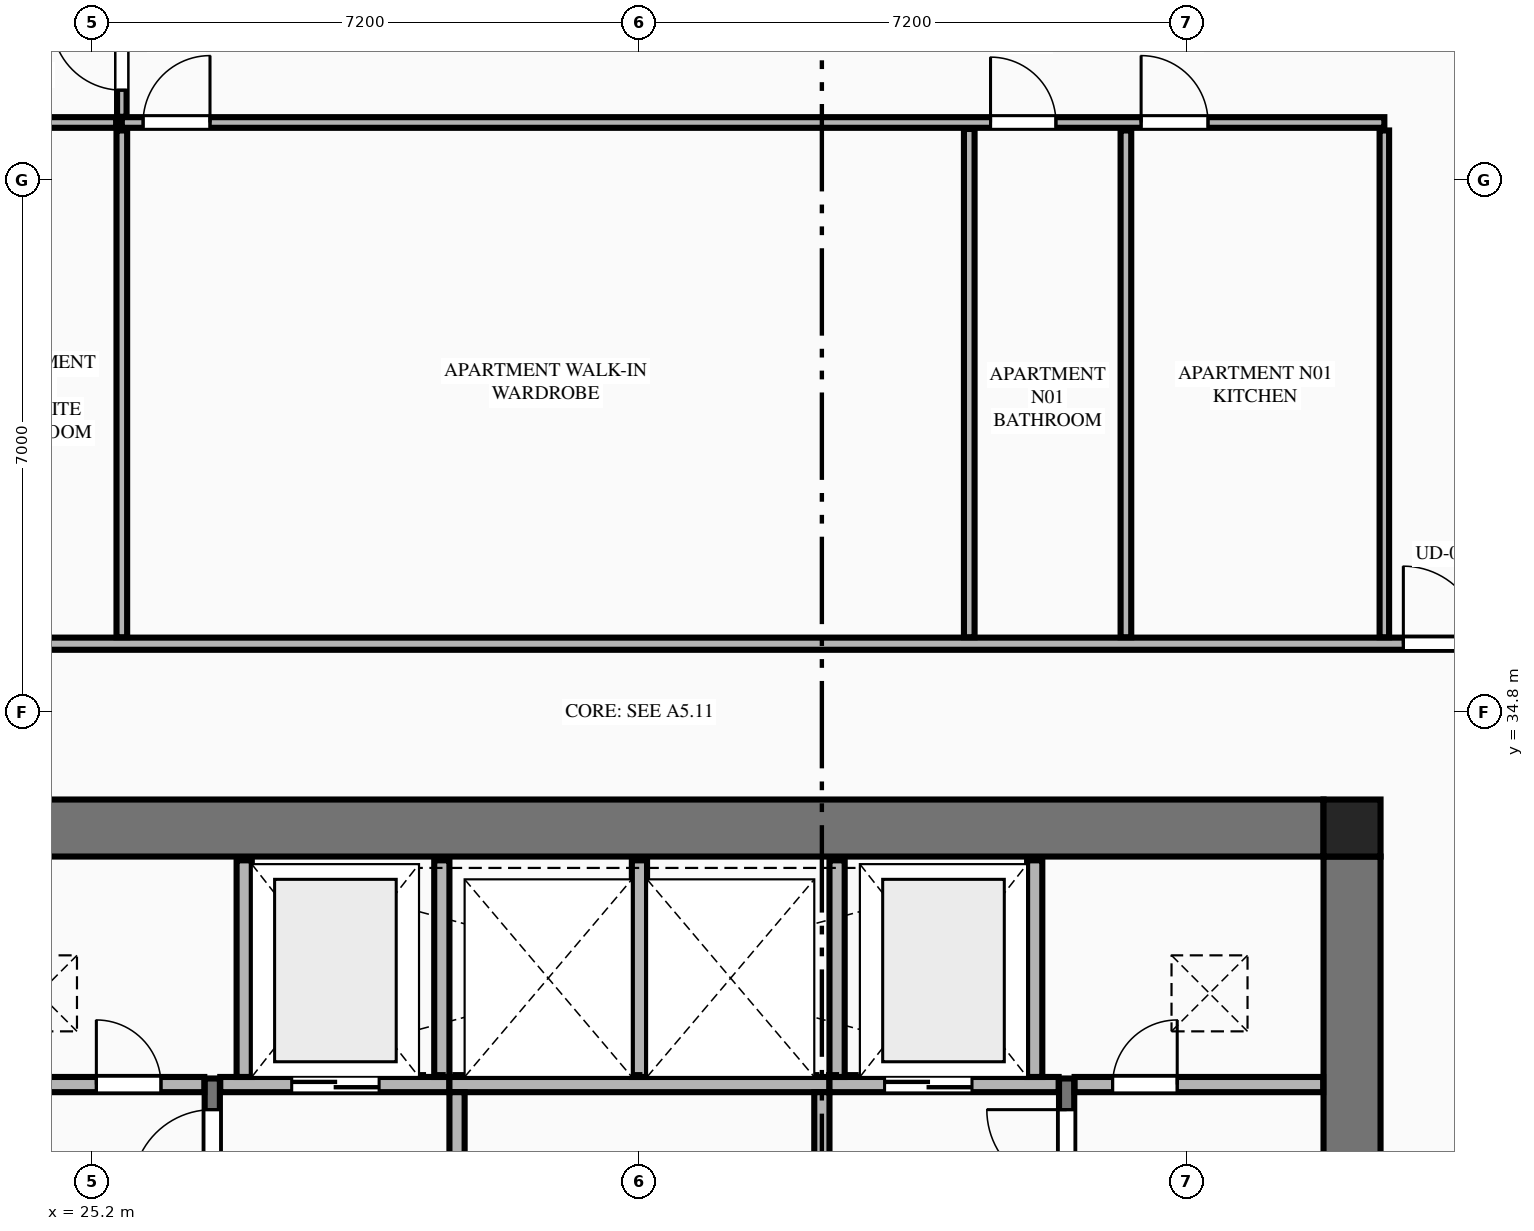
"""IFC4 building model, lengths in metres.
Left out: names, types, materials, properties, quantities, classifications, styles, units other than length and angle.
Written with IfcOpenShell. Run it as: python <this file> out.ifc"""

import sys

from ifc_helpers import new_model, si_unit, direction, frame, frame_2d, origin, origin_2d, place, context, subcontext, project, spatial, rectangle, extrude, element, fill, save


model = new_model("IFC4")
c1 = context("Model", 3, precision=1e-05, world=origin(), true_north=direction((0.0, 1.0)))
c2 = subcontext(c1, "Body", "Model", "MODEL_VIEW")
j1 = project(units=[si_unit("LENGTHUNIT", "METRE"), si_unit("PLANEANGLEUNIT", "RADIAN")], contexts=[c1])
p1 = place(None, origin())
s1 = spatial("IfcSite", under=j1, at=p1, CompositionType="ELEMENT")
p2 = place(p1, origin())
s2 = spatial("IfcBuilding", under=s1, at=p2, CompositionType="ELEMENT")
p3 = place(p2, frame((0.0, 0.0, 83.55)))
s3 = spatial("IfcBuildingStorey", under=s2, at=p3, CompositionType="ELEMENT", Elevation=83.55)
p4 = place(p3, frame((41.775, 33.275, 0.0), z_axis=(0.0, 0.0, 1.0), x_axis=(1.0, 0.0, 0.0)))
e1 = element("IfcColumn", 1, at=p4, inside=s3, PredefinedType="COLUMN", context=c2, shape_type="SweptSolid", body=[
    extrude(rectangle(XDim=0.75, YDim=0.75, at=origin_2d()), origin(), (0.0, 0.0, 1.0), 3.55),
])
p5 = place(p3, frame((23.4, 33.275, 0.0), z_axis=(0.0, 0.0, 1.0), x_axis=(1.0, 0.0, 0.0)))
e2 = element("IfcWall", 2, at=p5, inside=s3, PredefinedType="SHEAR", context=c2, shape_type="SweptSolid", body=[
    extrude(rectangle(XDim=18.0, YDim=0.75, at=frame_2d((9.0, 0.0))), origin(), (0.0, 0.0, 1.0), 3.33),
])
p6 = place(p3, frame((41.775, 18.9, 0.0), z_axis=(0.0, 0.0, 1.0), x_axis=(0.0, 1.0, 0.0)))
e3 = element("IfcWall", 3, at=p6, inside=s3, PredefinedType="SHEAR", context=c2, shape_type="SweptSolid", body=[
    extrude(rectangle(XDim=14.0, YDim=0.75, at=frame_2d((7.0, 0.0))), origin(), (0.0, 0.0, 1.0), 3.33),
])
p7 = place(p6, frame((2.94, 0.0, 0.0)))
e4 = element("IfcOpeningElement", 4, at=p7, cuts=e3, PredefinedType="OPENING", context=c2, shape_type="SweptSolid", body=[
    extrude(rectangle(XDim=1.22, YDim=2.25, at=frame_2d((0.61, 1.125))), frame((0.0, 0.385, 0.0), z_axis=(0.0, -1.0, 0.0), x_axis=(1.0, 0.0, 0.0)), (0.0, 0.0, 1.0), 0.77),
])
p8 = place(p3, frame((26.78, 23.2, 0.0), z_axis=(0.0, 0.0, 1.0), x_axis=(0.0, 1.0, 0.0)))
e5 = element("IfcWall", 5, at=p8, inside=s3, PredefinedType="SHEAR", context=c2, shape_type="SweptSolid", body=[
    extrude(rectangle(XDim=6.78, YDim=0.2, at=frame_2d((3.39, 0.0))), origin(), (0.0, 0.0, 1.0), 3.55),
])
p9 = place(p8, frame((5.32, 0.0, 0.0)))
e6 = element("IfcOpeningElement", 6, at=p9, cuts=e5, PredefinedType="OPENING", context=c2, shape_type="SweptSolid", body=[
    extrude(rectangle(XDim=1.05, YDim=2.15, at=frame_2d((0.525, 1.075))), frame((0.0, 0.11, 0.0), z_axis=(0.0, -1.0, 0.0), x_axis=(1.0, 0.0, 0.0)), (0.0, 0.0, 1.0), 0.22),
])
p10 = place(p3, frame((38.02, 23.2, 0.0), z_axis=(0.0, 0.0, 1.0), x_axis=(0.0, 1.0, 0.0)))
e7 = element("IfcWall", 7, at=p10, inside=s3, PredefinedType="SHEAR", context=c2, shape_type="SweptSolid", body=[
    extrude(rectangle(XDim=6.78, YDim=0.2, at=frame_2d((3.39, 0.0))), origin(), (0.0, 0.0, 1.0), 3.55),
])
p11 = place(p10, frame((5.32, 0.0, 0.0)))
e8 = element("IfcOpeningElement", 8, at=p11, cuts=e7, PredefinedType="OPENING", context=c2, shape_type="SweptSolid", body=[
    extrude(rectangle(XDim=1.05, YDim=2.15, at=frame_2d((0.525, 1.075))), frame((0.0, 0.11, 0.0), z_axis=(0.0, -1.0, 0.0), x_axis=(1.0, 0.0, 0.0)), (0.0, 0.0, 1.0), 0.22),
])
p12 = place(p3, frame((23.405, 29.9, 0.0), z_axis=(0.0, 0.0, 1.0), x_axis=(1.0, 0.0, 0.0)))
e9 = element("IfcWall", 9, at=p12, inside=s3, PredefinedType="PLUMBINGWALL", context=c2, shape_type="SweptSolid", body=[
    extrude(rectangle(XDim=3.27, YDim=0.2, at=frame_2d((1.635, 0.0))), origin(), (0.0, 0.0, 1.0), 3.33),
])
p13 = place(p12, frame((1.85, 0.0, 0.0)))
e10 = element("IfcOpeningElement", 10, at=p13, cuts=e9, PredefinedType="OPENING", context=c2, shape_type="SweptSolid", body=[
    extrude(rectangle(XDim=0.85, YDim=2.05, at=frame_2d((0.425, 1.025))), frame((0.0, 0.11, 0.0), z_axis=(0.0, -1.0, 0.0), x_axis=(1.0, 0.0, 0.0)), (0.0, 0.0, 1.0), 0.22),
])
p14 = place(p3, frame((26.885, 29.9, 0.0), z_axis=(0.0, 0.0, 1.0), x_axis=(1.0, 0.0, 0.0)))
e11 = element("IfcWall", 11, at=p14, inside=s3, PredefinedType="PLUMBINGWALL", context=c2, shape_type="SweptSolid", body=[
    extrude(rectangle(XDim=3.015, YDim=0.2, at=frame_2d((1.507, 0.0))), origin(), (0.0, 0.0, 1.0), 3.33),
])
p15 = place(p14, frame((0.94, 0.0, 0.0)))
e12 = element("IfcOpeningElement", 12, at=p15, cuts=e11, PredefinedType="OPENING", context=c2, shape_type="SweptSolid", body=[
    extrude(rectangle(XDim=1.15, YDim=2.2, at=frame_2d((0.575, 1.1))), frame((0.0, 0.11, 0.0), z_axis=(0.0, -1.0, 0.0), x_axis=(1.0, 0.0, 0.0)), (0.0, 0.0, 1.0), 0.22),
])
p16 = place(p3, frame((29.9, 29.9, 0.0), z_axis=(0.0, 0.0, 1.0), x_axis=(1.0, 0.0, 0.0)))
e13 = element("IfcWall", 13, at=p16, inside=s3, PredefinedType="PLUMBINGWALL", context=c2, shape_type="SweptSolid", body=[
    extrude(rectangle(XDim=5.0, YDim=0.2, at=frame_2d((2.5, 0.0))), origin(), (0.0, 0.0, 1.0), 3.33),
])
p17 = place(p3, frame((34.9, 29.9, 0.0), z_axis=(0.0, 0.0, 1.0), x_axis=(1.0, 0.0, 0.0)))
e14 = element("IfcWall", 14, at=p17, inside=s3, PredefinedType="PLUMBINGWALL", context=c2, shape_type="SweptSolid", body=[
    extrude(rectangle(XDim=3.015, YDim=0.2, at=frame_2d((1.508, 0.0))), origin(), (0.0, 0.0, 1.0), 3.33),
])
p18 = place(p17, frame((0.725, 0.0, 0.0)))
e15 = element("IfcOpeningElement", 15, at=p18, cuts=e14, PredefinedType="OPENING", context=c2, shape_type="SweptSolid", body=[
    extrude(rectangle(XDim=1.15, YDim=2.2, at=frame_2d((0.575, 1.1))), frame((0.0, 0.11, 0.0), z_axis=(0.0, -1.0, 0.0), x_axis=(1.0, 0.0, 0.0)), (0.0, 0.0, 1.0), 0.22),
])
p19 = place(p3, frame((38.125, 29.9, 0.0), z_axis=(0.0, 0.0, 1.0), x_axis=(1.0, 0.0, 0.0)))
e16 = element("IfcWall", 16, at=p19, inside=s3, PredefinedType="PLUMBINGWALL", context=c2, shape_type="SweptSolid", body=[
    extrude(rectangle(XDim=3.27, YDim=0.2, at=frame_2d((1.635, 0.0))), origin(), (0.0, 0.0, 1.0), 3.33),
])
p20 = place(p19, frame((0.5, 0.0, 0.0)))
e17 = element("IfcOpeningElement", 17, at=p20, cuts=e16, PredefinedType="OPENING", context=c2, shape_type="SweptSolid", body=[
    extrude(rectangle(XDim=0.85, YDim=2.05, at=frame_2d((0.425, 1.025))), frame((0.0, 0.11, 0.0), z_axis=(0.0, -1.0, 0.0), x_axis=(1.0, 0.0, 0.0)), (0.0, 0.0, 1.0), 0.22),
])
for number, where, z_axis, x_axis in (
    (18, (27.2, 30.0, 0.0), (0.0, 0.0, 1.0), (0.0, 1.0, 0.0)),
    (19, (29.8, 30.0, 0.0), (0.0, 0.0, 1.0), (0.0, 1.0, 0.0)),
    (20, (32.4, 30.0, 0.0), (0.0, 0.0, 1.0), (0.0, 1.0, 0.0)),
    (21, (35.0, 30.0, 0.0), (0.0, 0.0, 1.0), (0.0, 1.0, 0.0)),
    (22, (37.6, 30.0, 0.0), (0.0, 0.0, 1.0), (0.0, 1.0, 0.0)),
):
    element("IfcWall", number, at=place(p3, frame(where, z_axis=z_axis, x_axis=x_axis)), inside=s3, PredefinedType="PLUMBINGWALL", context=c2, shape_type="SweptSolid", body=[
        extrude(rectangle(XDim=2.85, YDim=0.2, at=frame_2d((1.425, 0.0))), origin(), (0.0, 0.0, 1.0), 3.33),
    ])
p21 = place(p3, frame((30.0, 27.05, 0.0), z_axis=(0.0, 0.0, 1.0), x_axis=(0.0, 1.0, 0.0)))
e23 = element("IfcWall", 23, at=p21, inside=s3, PredefinedType="PLUMBINGWALL", context=c2, shape_type="SweptSolid", body=[
    extrude(rectangle(XDim=2.75, YDim=0.2, at=frame_2d((1.375, 0.0))), origin(), (0.0, 0.0, 1.0), 3.33),
])
p22 = place(p21, frame((0.85, 0.0, 0.0)))
e24 = element("IfcOpeningElement", 24, at=p22, cuts=e23, PredefinedType="OPENING", context=c2, shape_type="SweptSolid", body=[
    extrude(rectangle(XDim=1.0, YDim=2.15, at=frame_2d((0.5, 1.075))), frame((0.0, 0.11, 0.0), z_axis=(0.0, -1.0, 0.0), x_axis=(1.0, 0.0, 0.0)), (0.0, 0.0, 1.0), 0.22),
])
p23 = place(p3, frame((34.8, 27.05, 0.0), z_axis=(0.0, 0.0, 1.0), x_axis=(0.0, 1.0, 0.0)))
e25 = element("IfcWall", 25, at=p23, inside=s3, PredefinedType="PLUMBINGWALL", context=c2, shape_type="SweptSolid", body=[
    extrude(rectangle(XDim=2.75, YDim=0.2, at=frame_2d((1.375, 0.0))), origin(), (0.0, 0.0, 1.0), 3.33),
])
p24 = place(p23, frame((0.85, 0.0, 0.0)))
e26 = element("IfcOpeningElement", 26, at=p24, cuts=e25, PredefinedType="OPENING", context=c2, shape_type="SweptSolid", body=[
    extrude(rectangle(XDim=1.0, YDim=2.15, at=frame_2d((0.5, 1.075))), frame((0.0, 0.11, 0.0), z_axis=(0.0, -1.0, 0.0), x_axis=(1.0, 0.0, 0.0)), (0.0, 0.0, 1.0), 0.22),
])
p25 = place(p3, frame((20.145, 35.7, 0.0), z_axis=(0.0, 0.0, 1.0), x_axis=(1.0, 0.0, 0.0)))
e27 = element("IfcWall", 27, at=p25, inside=s3, PredefinedType="PARTITIONING", context=c2, shape_type="SweptSolid", body=[
    extrude(rectangle(XDim=24.51, YDim=0.16, at=frame_2d((12.255, 0.0))), origin(), (0.0, 0.0, 1.0), 3.33),
])
p26 = place(p25, frame((22.305, 0.0, 0.0)))
e28 = element("IfcOpeningElement", 28, at=p26, cuts=e27, PredefinedType="OPENING", context=c2, shape_type="SweptSolid", body=[
    extrude(rectangle(XDim=1.02, YDim=2.25, at=frame_2d((0.51, 1.125))), frame((0.0, 0.09, 0.0), z_axis=(0.0, -1.0, 0.0), x_axis=(1.0, 0.0, 0.0)), (0.0, 0.0, 1.0), 0.18),
])
p27 = place(p3, frame((42.2, 35.785, 0.0), z_axis=(0.0, 0.0, 1.0), x_axis=(0.0, 1.0, 0.0)))
e29 = element("IfcWall", 29, at=p27, inside=s3, PredefinedType="PARTITIONING", context=c2, shape_type="SweptSolid", body=[
    extrude(rectangle(XDim=6.667, YDim=0.125, at=frame_2d((3.333, 0.0))), origin(), (0.0, 0.0, 1.0), 2.636),
])
p28 = place(p3, frame((25.59, 42.557, 0.0), z_axis=(0.0, 0.0, 1.0), x_axis=(1.0, 0.0, 0.0)))
e30 = element("IfcWall", 30, at=p28, inside=s3, PredefinedType="PLUMBINGWALL", context=c2, shape_type="SweptSolid", body=[
    extrude(rectangle(XDim=16.61, YDim=0.14, at=frame_2d((8.305, 0.0))), origin(), (0.0, 0.0, 1.0), 3.33),
])
p29 = place(p28, frame((0.28, 0.0, 0.0)))
e31 = element("IfcOpeningElement", 31, at=p29, cuts=e30, PredefinedType="OPENING", context=c2, shape_type="SweptSolid", body=[
    extrude(rectangle(XDim=0.88, YDim=2.15, at=frame_2d((0.44, 1.075))), frame((0.0, 0.08, 0.0), z_axis=(0.0, -1.0, 0.0), x_axis=(1.0, 0.0, 0.0)), (0.0, 0.0, 1.0), 0.16),
])
p30 = place(p28, frame((11.429, 0.0, 0.0)))
e32 = element("IfcOpeningElement", 32, at=p30, cuts=e30, PredefinedType="OPENING", context=c2, shape_type="SweptSolid", body=[
    extrude(rectangle(XDim=0.86, YDim=2.1, at=frame_2d((0.43, 1.05))), frame((0.0, 0.08, 0.0), z_axis=(0.0, -1.0, 0.0), x_axis=(1.0, 0.0, 0.0)), (0.0, 0.0, 1.0), 0.16),
])
p31 = place(p28, frame((13.41, 0.0, 0.0)))
e33 = element("IfcOpeningElement", 33, at=p31, cuts=e30, PredefinedType="OPENING", context=c2, shape_type="SweptSolid", body=[
    extrude(rectangle(XDim=0.88, YDim=2.15, at=frame_2d((0.44, 1.075))), frame((0.0, 0.08, 0.0), z_axis=(0.0, -1.0, 0.0), x_axis=(1.0, 0.0, 0.0)), (0.0, 0.0, 1.0), 0.16),
])
p32 = place(p3, frame((20.145, 42.557, 0.0), z_axis=(0.0, 0.0, 1.0), x_axis=(1.0, 0.0, 0.0)))
e34 = element("IfcWall", 34, at=p32, inside=s3, PredefinedType="PLUMBINGWALL", context=c2, shape_type="SweptSolid", body=[
    extrude(rectangle(XDim=5.37, YDim=0.14, at=frame_2d((2.685, 0.0))), origin(), (0.0, 0.0, 1.0), 3.33),
])
p33 = place(p32, frame((0.28, 0.0, 0.0)))
e35 = element("IfcOpeningElement", 35, at=p33, cuts=e34, PredefinedType="OPENING", context=c2, shape_type="SweptSolid", body=[
    extrude(rectangle(XDim=0.88, YDim=2.15, at=frame_2d((0.44, 1.075))), frame((0.0, 0.08, 0.0), z_axis=(0.0, -1.0, 0.0), x_axis=(1.0, 0.0, 0.0)), (0.0, 0.0, 1.0), 0.16),
])
p34 = place(p32, frame((3.589, 0.0, 0.0)))
e36 = element("IfcOpeningElement", 36, at=p34, cuts=e34, PredefinedType="OPENING", context=c2, shape_type="SweptSolid", body=[
    extrude(rectangle(XDim=0.86, YDim=2.1, at=frame_2d((0.43, 1.05))), frame((0.0, 0.08, 0.0), z_axis=(0.0, -1.0, 0.0), x_axis=(1.0, 0.0, 0.0)), (0.0, 0.0, 1.0), 0.16),
])
for number, where, z_axis, x_axis in (
    (37, (38.8, 35.785, 0.0), (0.0, 0.0, 1.0), (0.0, 1.0, 0.0)),
    (38, (25.59, 35.785, 0.0), (0.0, 0.0, 1.0), (0.0, 1.0, 0.0)),
):
    element("IfcWall", number, at=place(p3, frame(where, z_axis=z_axis, x_axis=x_axis)), inside=s3, PredefinedType="PLUMBINGWALL", context=c2, shape_type="SweptSolid", body=[
        extrude(rectangle(XDim=6.667, YDim=0.14, at=frame_2d((3.333, 0.0))), origin(), (0.0, 0.0, 1.0), 3.33),
    ])
p35 = place(p3, frame((25.59, 42.632, 0.0), z_axis=(0.0, 0.0, 1.0), x_axis=(0.0, 1.0, 0.0)))
e39 = element("IfcWall", 39, at=p35, inside=s3, PredefinedType="PARTITIONING", context=c2, shape_type="SweptSolid", body=[
    extrude(rectangle(XDim=6.603, YDim=0.125, at=frame_2d((3.302, 0.0))), origin(), (0.0, 0.0, 1.0), 3.33),
])
p36 = place(p35, frame((0.35, 0.0, 0.0)))
e40 = element("IfcOpeningElement", 40, at=p36, cuts=e39, PredefinedType="OPENING", context=c2, shape_type="SweptSolid", body=[
    extrude(rectangle(XDim=0.92, YDim=2.15, at=frame_2d((0.46, 1.075))), frame((0.0, 0.073, 0.0), z_axis=(0.0, -1.0, 0.0), x_axis=(1.0, 0.0, 0.0)), (0.0, 0.0, 1.0), 0.145),
])
p37 = place(p3, frame((36.739, 35.785, 0.0), z_axis=(0.0, 0.0, 1.0), x_axis=(0.0, 1.0, 0.0)))
e41 = element("IfcWall", 41, at=p37, inside=s3, PredefinedType="PLUMBINGWALL", context=c2, shape_type="SweptSolid", body=[
    extrude(rectangle(XDim=6.687, YDim=0.14, at=frame_2d((3.344, 0.0))), origin(), (0.0, 0.0, 1.0), 3.33),
])
p38 = place(p9, origin())
e42 = element("IfcDoor", 42, at=p38, inside=s3, OperationType="SINGLE_SWING_LEFT", PredefinedType="DOOR", context=c2, shape_type="SweptSolid", body=[
    extrude(rectangle(XDim=1.05, YDim=2.15, at=frame_2d((0.525, 1.075))), frame((0.0, 0.025, 0.0), z_axis=(0.0, -1.0, 0.0), x_axis=(1.0, 0.0, 0.0)), (0.0, 0.0, 1.0), 0.05),
])
fill(e6, e42)
p39 = place(p11, origin())
e43 = element("IfcDoor", 43, at=p39, inside=s3, OperationType="SINGLE_SWING_RIGHT", PredefinedType="DOOR", context=c2, shape_type="SweptSolid", body=[
    extrude(rectangle(XDim=1.05, YDim=2.15, at=frame_2d((0.525, 1.075))), frame((0.0, 0.025, 0.0), z_axis=(0.0, -1.0, 0.0), x_axis=(1.0, 0.0, 0.0)), (0.0, 0.0, 1.0), 0.05),
])
fill(e8, e43)
p40 = place(p13, origin())
e44 = element("IfcDoor", 44, at=p40, inside=s3, OperationType="SINGLE_SWING_LEFT", PredefinedType="DOOR", context=c2, shape_type="SweptSolid", body=[
    extrude(rectangle(XDim=0.85, YDim=2.05, at=frame_2d((0.425, 1.025))), frame((0.0, 0.025, 0.0), z_axis=(0.0, -1.0, 0.0), x_axis=(1.0, 0.0, 0.0)), (0.0, 0.0, 1.0), 0.05),
])
fill(e10, e44)
p41 = place(p20, origin())
e45 = element("IfcDoor", 45, at=p41, inside=s3, OperationType="SINGLE_SWING_RIGHT", PredefinedType="DOOR", context=c2, shape_type="SweptSolid", body=[
    extrude(rectangle(XDim=0.85, YDim=2.05, at=frame_2d((0.425, 1.025))), frame((0.0, 0.025, 0.0), z_axis=(0.0, -1.0, 0.0), x_axis=(1.0, 0.0, 0.0)), (0.0, 0.0, 1.0), 0.05),
])
fill(e17, e45)
p42 = place(p15, origin())
e46 = element("IfcDoor", 46, at=p42, inside=s3, OperationType="DOUBLE_DOOR_SLIDING", PredefinedType="DOOR", context=c2, shape_type="SweptSolid", body=[
    extrude(rectangle(XDim=1.15, YDim=2.2, at=frame_2d((0.575, 1.1))), frame((0.0, 0.025, 0.0), z_axis=(0.0, -1.0, 0.0), x_axis=(1.0, 0.0, 0.0)), (0.0, 0.0, 1.0), 0.05),
])
fill(e12, e46)
p43 = place(p18, origin())
e47 = element("IfcDoor", 47, at=p43, inside=s3, OperationType="DOUBLE_DOOR_SLIDING", PredefinedType="DOOR", context=c2, shape_type="SweptSolid", body=[
    extrude(rectangle(XDim=1.15, YDim=2.2, at=frame_2d((0.575, 1.1))), frame((0.0, 0.025, 0.0), z_axis=(0.0, -1.0, 0.0), x_axis=(1.0, 0.0, 0.0)), (0.0, 0.0, 1.0), 0.05),
])
fill(e15, e47)
p44 = place(p29, origin())
e48 = element("IfcDoor", 48, at=p44, inside=s3, OperationType="SINGLE_SWING_RIGHT", PredefinedType="DOOR", context=c2, shape_type="SweptSolid", body=[
    extrude(rectangle(XDim=0.88, YDim=2.15, at=frame_2d((0.44, 1.075))), frame((0.0, 0.025, 0.0), z_axis=(0.0, -1.0, 0.0), x_axis=(1.0, 0.0, 0.0)), (0.0, 0.0, 1.0), 0.05),
])
fill(e31, e48)
p45 = place(p30, origin())
e49 = element("IfcDoor", 49, at=p45, inside=s3, OperationType="SINGLE_SWING_LEFT", PredefinedType="DOOR", context=c2, shape_type="SweptSolid", body=[
    extrude(rectangle(XDim=0.86, YDim=2.1, at=frame_2d((0.43, 1.05))), frame((0.0, 0.025, 0.0), z_axis=(0.0, -1.0, 0.0), x_axis=(1.0, 0.0, 0.0)), (0.0, 0.0, 1.0), 0.05),
])
fill(e32, e49)
p46 = place(p26, origin())
e50 = element("IfcDoor", 50, at=p46, inside=s3, OperationType="SINGLE_SWING_LEFT", PredefinedType="DOOR", context=c2, shape_type="SweptSolid", body=[
    extrude(rectangle(XDim=1.02, YDim=2.25, at=frame_2d((0.51, 1.125))), frame((0.0, 0.025, 0.0), z_axis=(0.0, -1.0, 0.0), x_axis=(1.0, 0.0, 0.0)), (0.0, 0.0, 1.0), 0.05),
])
fill(e28, e50)
p47 = place(p31, origin())
e51 = element("IfcDoor", 51, at=p47, inside=s3, OperationType="SINGLE_SWING_LEFT", PredefinedType="DOOR", context=c2, shape_type="SweptSolid", body=[
    extrude(rectangle(XDim=0.88, YDim=2.15, at=frame_2d((0.44, 1.075))), frame((0.0, 0.025, 0.0), z_axis=(0.0, -1.0, 0.0), x_axis=(1.0, 0.0, 0.0)), (0.0, 0.0, 1.0), 0.05),
])
fill(e33, e51)
p48 = place(p36, origin())
e52 = element("IfcDoor", 52, at=p48, inside=s3, OperationType="SINGLE_SWING_RIGHT", PredefinedType="DOOR", context=c2, shape_type="SweptSolid", body=[
    extrude(rectangle(XDim=0.92, YDim=2.15, at=frame_2d((0.46, 1.075))), frame((0.0, 0.025, 0.0), z_axis=(0.0, -1.0, 0.0), x_axis=(1.0, 0.0, 0.0)), (0.0, 0.0, 1.0), 0.05),
])
fill(e40, e52)
save(model, sys.argv[1])
